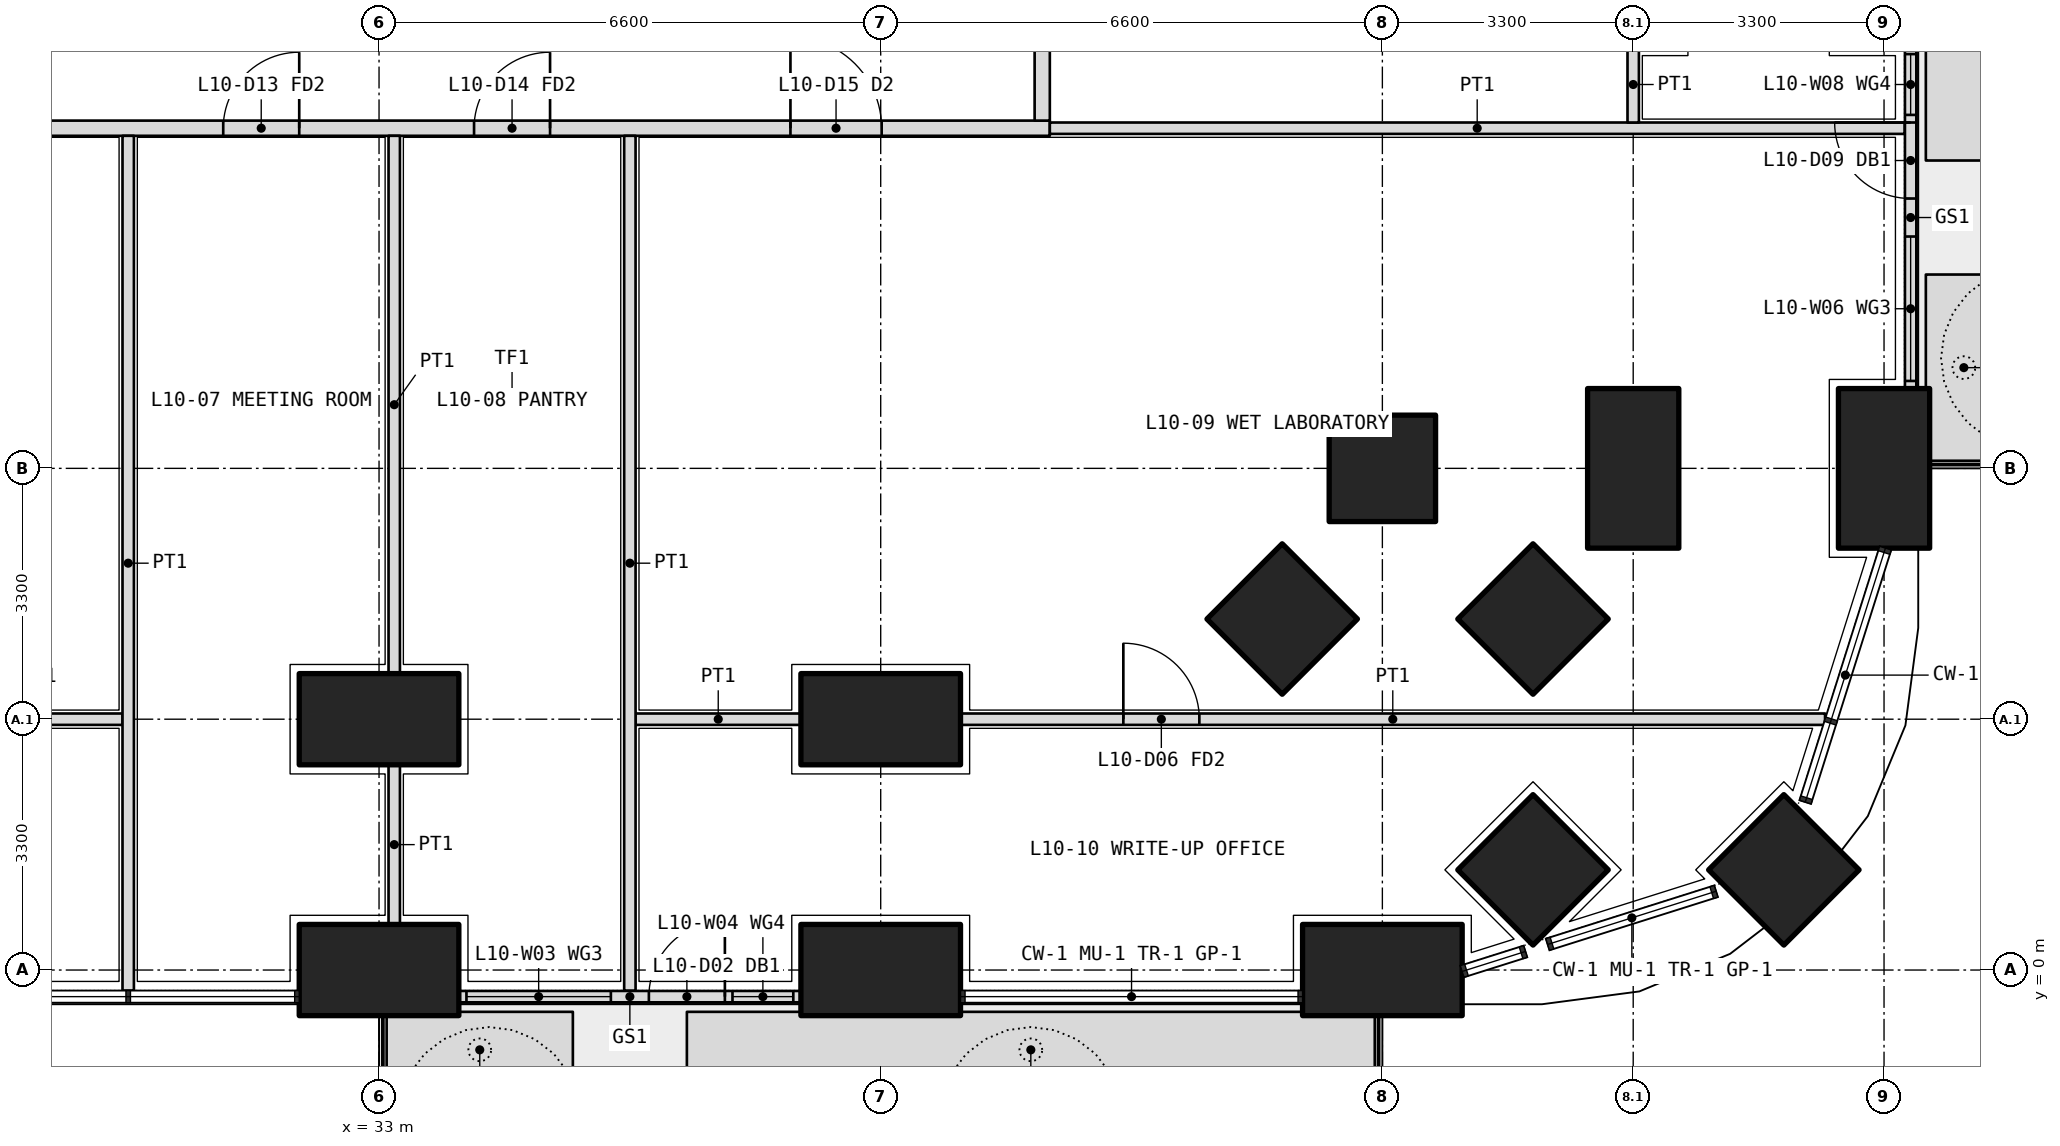
"""IFC4 building model, lengths in metres.
Left out: names, types, materials, properties, quantities, classifications, styles, units other than length and angle.
Written with IfcOpenShell. Run it as: python <this file> out.ifc"""

import sys

from ifc_helpers import new_model, si_unit, direction, frame, frame_2d, origin, origin_2d, place, context, subcontext, project, spatial, polyline, rectangle, outline, extrude, element, fill, save


model = new_model("IFC4")
c1 = context("Model", 3, precision=1e-05, world=origin(), true_north=direction((0.0, 1.0)))
c2 = subcontext(c1, "Body", "Model", "MODEL_VIEW")
j1 = project(units=[si_unit("LENGTHUNIT", "METRE"), si_unit("PLANEANGLEUNIT", "RADIAN")], contexts=[c1])
p1 = place(None, origin())
s1 = spatial("IfcSite", under=j1, at=p1, CompositionType="ELEMENT")
p2 = place(p1, origin())
s2 = spatial("IfcBuilding", under=s1, at=p2, CompositionType="ELEMENT")
p3 = place(p2, frame((0.0, 0.0, 46.5)))
s3 = spatial("IfcBuildingStorey", under=s2, at=p3, CompositionType="ELEMENT", Elevation=46.5)
p4 = place(p3, frame((51.482, 1.318, 0.0), z_axis=(0.0, 0.0, 1.0), x_axis=(0.707106781187, 0.707106781187, 0.0)))
e1 = element("IfcColumn", 1, at=p4, inside=s3, PredefinedType="COLUMN", context=c2, shape_type="SweptSolid", body=[
    extrude(rectangle(XDim=1.4, YDim=1.4, at=origin_2d()), origin(), (0.0, 0.0, 1.0), 4.2),
])
for number, where, z_axis, x_axis in (
    (2, (33.0, 0.0, 0.0), (0.0, 0.0, 1.0), (1.0, 0.0, 0.0)),
    (3, (39.6, 0.0, 0.0), (0.0, 0.0, 1.0), (1.0, 0.0, 0.0)),
    (4, (46.2, 0.0, 0.0), (0.0, 0.0, 1.0), (1.0, 0.0, 0.0)),
    (5, (52.8, 6.6, 0.0), (0.0, 0.0, 1.0), (0.0, 1.0, 0.0)),
):
    element("IfcColumn", number, at=place(p3, frame(where, z_axis=z_axis, x_axis=x_axis)), inside=s3, PredefinedType="COLUMN", context=c2, shape_type="SweptSolid", body=[
        extrude(rectangle(XDim=2.1, YDim=1.2, at=origin_2d()), origin(), (0.0, 0.0, 1.0), 4.2),
    ])
for number, where, z_axis, x_axis in (
    (6, (46.2, 6.6, 0.0), (0.0, 0.0, 1.0), (1.0, 0.0, 0.0)),
    (7, (48.182, 1.318, 0.0), (0.0, 0.0, 1.0), (0.707, 0.707, 0.0)),
):
    element("IfcColumn", number, at=place(p3, frame(where, z_axis=z_axis, x_axis=x_axis)), inside=s3, PredefinedType="COLUMN", context=c2, shape_type="SweptSolid", body=[
        extrude(rectangle(XDim=1.4, YDim=1.4, at=origin_2d()), origin(), (0.0, 0.0, 1.0), 4.2),
    ])
p5 = place(p3, frame((49.5, 6.6, 0.0), z_axis=(0.0, 0.0, 1.0), x_axis=(0.0, 1.0, 0.0)))
e8 = element("IfcColumn", 8, at=p5, inside=s3, PredefinedType="COLUMN", context=c2, shape_type="SweptSolid", body=[
    extrude(rectangle(XDim=2.1, YDim=1.2, at=origin_2d()), origin(), (0.0, 0.0, 1.0), 4.2),
])
p6 = place(p3, frame((48.182, 4.618, 0.0), z_axis=(0.0, 0.0, 1.0), x_axis=(0.707106781187, 0.707106781187, 0.0)))
e9 = element("IfcColumn", 9, at=p6, inside=s3, PredefinedType="COLUMN", context=c2, shape_type="SweptSolid", body=[
    extrude(rectangle(XDim=1.4, YDim=1.4, at=origin_2d()), origin(), (0.0, 0.0, 1.0), 4.2),
])
for number, where, z_axis, x_axis in (
    (10, (33.0, 3.3, 0.0), (0.0, 0.0, 1.0), (1.0, 0.0, 0.0)),
    (11, (39.6, 3.3, 0.0), (0.0, 0.0, 1.0), (1.0, 0.0, 0.0)),
):
    element("IfcColumn", number, at=place(p3, frame(where, z_axis=z_axis, x_axis=x_axis)), inside=s3, PredefinedType="COLUMN", context=c2, shape_type="SweptSolid", body=[
        extrude(rectangle(XDim=2.1, YDim=1.2, at=origin_2d()), origin(), (0.0, 0.0, 1.0), 4.2),
    ])
p7 = place(p3, frame((44.882, 4.618, 0.0), z_axis=(0.0, 0.0, 1.0), x_axis=(0.707106781187, 0.707106781187, 0.0)))
e12 = element("IfcColumn", 12, at=p7, inside=s3, PredefinedType="COLUMN", context=c2, shape_type="SweptSolid", body=[
    extrude(rectangle(XDim=1.4, YDim=1.4, at=origin_2d()), origin(), (0.0, 0.0, 1.0), 4.2),
])
p8 = place(p3, origin())
e13 = element("IfcWall", 13, at=p8, inside=s3, PredefinedType="USERDEFINED", context=c2, shape_type="SweptSolid", body=[
    extrude(outline(polyline([(33.1, -1.55), (35.55, -1.55), (35.55, -0.55), (33.1, -0.55), (33.1, -1.55)]), holes=[polyline([(33.25, -1.4), (35.4, -1.4), (35.4, -0.7), (33.25, -0.7), (33.25, -1.4)])]), origin(), (0.0, 0.0, 1.0), 1.05),
])
p9 = place(p3, origin())
e14 = element("IfcWall", 14, at=p9, inside=s3, PredefinedType="USERDEFINED", context=c2, shape_type="SweptSolid", body=[
    extrude(outline(polyline([(37.05, -1.55), (46.1, -1.55), (46.1, -0.55), (37.05, -0.55), (37.05, -1.55)]), holes=[polyline([(37.2, -1.4), (45.95, -1.4), (45.95, -0.7), (37.2, -0.7), (37.2, -1.4)])]), origin(), (0.0, 0.0, 1.0), 1.05),
])
p10 = place(p3, origin())
e15 = element("IfcWall", 15, at=p10, inside=s3, PredefinedType="USERDEFINED", context=c2, shape_type="SweptSolid", body=[
    extrude(outline(polyline([(53.35, 6.7), (54.35, 6.7), (54.35, 9.15), (53.35, 9.15), (53.35, 6.7)]), holes=[polyline([(53.5, 6.85), (54.2, 6.85), (54.2, 9.0), (53.5, 9.0), (53.5, 6.85)])]), origin(), (0.0, 0.0, 1.0), 1.05),
])
p11 = place(p3, origin())
e16 = element("IfcWall", 16, at=p11, inside=s3, PredefinedType="USERDEFINED", context=c2, shape_type="SweptSolid", body=[
    extrude(outline(polyline([(53.35, 10.65), (54.35, 10.65), (54.35, 19.7), (53.35, 19.7), (53.35, 10.65)]), holes=[polyline([(53.5, 10.8), (54.2, 10.8), (54.2, 19.55), (53.5, 19.55), (53.5, 10.8)])]), origin(), (0.0, 0.0, 1.0), 1.05),
])
p12 = place(p3, frame((34.05, -0.35, 0.0), z_axis=(0.0, 0.0, 1.0), x_axis=(1.0, 0.0, 0.0)))
e17 = element("IfcWall", 17, at=p12, inside=s3, PredefinedType="SOLIDWALL", context=c2, shape_type="SweptSolid", body=[
    extrude(rectangle(XDim=4.5, YDim=0.15, at=frame_2d((2.25, 0.0))), origin(), (0.0, 0.0, 1.0), 2.7),
])
p13 = place(p12, frame((2.5, 0.0, 0.0)))
e18 = element("IfcOpeningElement", 18, at=p13, cuts=e17, PredefinedType="OPENING", context=c2, shape_type="SweptSolid", body=[
    extrude(rectangle(XDim=1.0, YDim=2.4, at=frame_2d((0.5, 1.2))), frame((0.0, 0.085, 0.0), z_axis=(0.0, -1.0, 0.0), x_axis=(1.0, 0.0, 0.0)), (0.0, 0.0, 1.0), 0.17),
])
p14 = place(p12, frame((0.1, 0.0, 0.1)))
e19 = element("IfcOpeningElement", 19, at=p14, cuts=e17, PredefinedType="OPENING", context=c2, shape_type="SweptSolid", body=[
    extrude(rectangle(XDim=1.9, YDim=2.3, at=frame_2d((0.95, 1.15))), frame((0.0, 0.085, 0.0), z_axis=(0.0, -1.0, 0.0), x_axis=(1.0, 0.0, 0.0)), (0.0, 0.0, 1.0), 0.17),
])
p15 = place(p12, frame((3.6, 0.0, 0.1)))
e20 = element("IfcOpeningElement", 20, at=p15, cuts=e17, PredefinedType="OPENING", context=c2, shape_type="SweptSolid", body=[
    extrude(rectangle(XDim=0.8, YDim=2.3, at=frame_2d((0.4, 1.15))), frame((0.0, 0.085, 0.0), z_axis=(0.0, -1.0, 0.0), x_axis=(1.0, 0.0, 0.0)), (0.0, 0.0, 1.0), 0.17),
])
p16 = place(p3, frame((53.15, 7.65, 0.0), z_axis=(0.0, 0.0, 1.0), x_axis=(0.0, 1.0, 0.0)))
e21 = element("IfcWall", 21, at=p16, inside=s3, PredefinedType="SOLIDWALL", context=c2, shape_type="SweptSolid", body=[
    extrude(rectangle(XDim=4.5, YDim=0.15, at=frame_2d((2.25, 0.0))), origin(), (0.0, 0.0, 1.0), 2.7),
])
p17 = place(p16, frame((2.5, 0.0, 0.0)))
e22 = element("IfcOpeningElement", 22, at=p17, cuts=e21, PredefinedType="OPENING", context=c2, shape_type="SweptSolid", body=[
    extrude(rectangle(XDim=1.0, YDim=2.4, at=frame_2d((0.5, 1.2))), frame((0.0, 0.085, 0.0), z_axis=(0.0, -1.0, 0.0), x_axis=(1.0, 0.0, 0.0)), (0.0, 0.0, 1.0), 0.17),
])
p18 = place(p16, frame((0.1, 0.0, 0.1)))
e23 = element("IfcOpeningElement", 23, at=p18, cuts=e21, PredefinedType="OPENING", context=c2, shape_type="SweptSolid", body=[
    extrude(rectangle(XDim=1.9, YDim=2.3, at=frame_2d((0.95, 1.15))), frame((0.0, 0.085, 0.0), z_axis=(0.0, -1.0, 0.0), x_axis=(1.0, 0.0, 0.0)), (0.0, 0.0, 1.0), 0.17),
])
p19 = place(p16, frame((3.6, 0.0, 0.1)))
e24 = element("IfcOpeningElement", 24, at=p19, cuts=e21, PredefinedType="OPENING", context=c2, shape_type="SweptSolid", body=[
    extrude(rectangle(XDim=0.8, YDim=2.3, at=frame_2d((0.4, 1.15))), frame((0.0, 0.085, 0.0), z_axis=(0.0, -1.0, 0.0), x_axis=(1.0, 0.0, 0.0)), (0.0, 0.0, 1.0), 0.17),
])
p20 = place(p3, frame((10.975, 11.075, 0.0), z_axis=(0.0, 0.0, 1.0), x_axis=(1.0, 0.0, 0.0)))
e25 = element("IfcWall", 25, at=p20, inside=s3, PredefinedType="PARTITIONING", context=c2, shape_type="SweptSolid", body=[
    extrude(rectangle(XDim=30.85, YDim=0.2, at=frame_2d((15.425, 0.0))), origin(), (0.0, 0.0, 1.0), 2.85),
])
p21 = place(p20, frame((2.312, 0.0, 0.0)))
e26 = element("IfcOpeningElement", 26, at=p21, cuts=e25, PredefinedType="OPENING", context=c2, shape_type="SweptSolid", body=[
    extrude(rectangle(XDim=1.0, YDim=2.1, at=frame_2d((0.5, 1.05))), frame((0.0, 0.11, 0.0), z_axis=(0.0, -1.0, 0.0), x_axis=(1.0, 0.0, 0.0)), (0.0, 0.0, 1.0), 0.22),
])
p22 = place(p20, frame((6.575, 0.0, 0.0)))
e27 = element("IfcOpeningElement", 27, at=p22, cuts=e25, PredefinedType="OPENING", context=c2, shape_type="SweptSolid", body=[
    extrude(rectangle(XDim=1.2, YDim=2.1, at=frame_2d((0.6, 1.05))), frame((0.0, 0.11, 0.0), z_axis=(0.0, -1.0, 0.0), x_axis=(1.0, 0.0, 0.0)), (0.0, 0.0, 1.0), 0.22),
])
p23 = place(p20, frame((13.275, 0.0, 0.0)))
e28 = element("IfcOpeningElement", 28, at=p23, cuts=e25, PredefinedType="OPENING", context=c2, shape_type="SweptSolid", body=[
    extrude(rectangle(XDim=1.0, YDim=2.1, at=frame_2d((0.5, 1.05))), frame((0.0, 0.11, 0.0), z_axis=(0.0, -1.0, 0.0), x_axis=(1.0, 0.0, 0.0)), (0.0, 0.0, 1.0), 0.22),
])
p24 = place(p20, frame((19.975, 0.0, 0.0)))
e29 = element("IfcOpeningElement", 29, at=p24, cuts=e25, PredefinedType="OPENING", context=c2, shape_type="SweptSolid", body=[
    extrude(rectangle(XDim=1.0, YDim=2.1, at=frame_2d((0.5, 1.05))), frame((0.0, 0.11, 0.0), z_axis=(0.0, -1.0, 0.0), x_axis=(1.0, 0.0, 0.0)), (0.0, 0.0, 1.0), 0.22),
])
p25 = place(p20, frame((23.275, 0.0, 0.0)))
e30 = element("IfcOpeningElement", 30, at=p25, cuts=e25, PredefinedType="OPENING", context=c2, shape_type="SweptSolid", body=[
    extrude(rectangle(XDim=1.0, YDim=2.1, at=frame_2d((0.5, 1.05))), frame((0.0, 0.11, 0.0), z_axis=(0.0, -1.0, 0.0), x_axis=(1.0, 0.0, 0.0)), (0.0, 0.0, 1.0), 0.22),
])
p26 = place(p20, frame((27.438, 0.0, 0.0)))
e31 = element("IfcOpeningElement", 31, at=p26, cuts=e25, PredefinedType="OPENING", context=c2, shape_type="SweptSolid", body=[
    extrude(rectangle(XDim=1.2, YDim=2.1, at=frame_2d((0.6, 1.05))), frame((0.0, 0.11, 0.0), z_axis=(0.0, -1.0, 0.0), x_axis=(1.0, 0.0, 0.0)), (0.0, 0.0, 1.0), 0.22),
])
p27 = place(p3, frame((41.725, 11.175, 0.0), z_axis=(0.0, 0.0, 1.0), x_axis=(0.0, 1.0, 0.0)))
e32 = element("IfcWall", 32, at=p27, inside=s3, PredefinedType="PARTITIONING", context=c2, shape_type="SweptSolid", body=[
    extrude(rectangle(XDim=23.85, YDim=0.2, at=frame_2d((11.925, 0.0))), origin(), (0.0, 0.0, 1.0), 2.85),
])
p28 = place(p27, frame((3.762, 0.0, 0.0)))
e33 = element("IfcOpeningElement", 33, at=p28, cuts=e32, PredefinedType="OPENING", context=c2, shape_type="SweptSolid", body=[
    extrude(rectangle(XDim=1.0, YDim=2.1, at=frame_2d((0.5, 1.05))), frame((0.0, 0.11, 0.0), z_axis=(0.0, -1.0, 0.0), x_axis=(1.0, 0.0, 0.0)), (0.0, 0.0, 1.0), 0.22),
])
p29 = place(p27, frame((9.625, 0.0, 0.0)))
e34 = element("IfcOpeningElement", 34, at=p29, cuts=e32, PredefinedType="OPENING", context=c2, shape_type="SweptSolid", body=[
    extrude(rectangle(XDim=1.0, YDim=2.1, at=frame_2d((0.5, 1.05))), frame((0.0, 0.11, 0.0), z_axis=(0.0, -1.0, 0.0), x_axis=(1.0, 0.0, 0.0)), (0.0, 0.0, 1.0), 0.22),
])
p30 = place(p27, frame((12.975, 0.0, 0.0)))
e35 = element("IfcOpeningElement", 35, at=p30, cuts=e32, PredefinedType="OPENING", context=c2, shape_type="SweptSolid", body=[
    extrude(rectangle(XDim=0.9, YDim=2.1, at=frame_2d((0.45, 1.05))), frame((0.0, 0.11, 0.0), z_axis=(0.0, -1.0, 0.0), x_axis=(1.0, 0.0, 0.0)), (0.0, 0.0, 1.0), 0.22),
])
p31 = place(p27, frame((17.925, 0.0, 0.0)))
e36 = element("IfcOpeningElement", 36, at=p31, cuts=e32, PredefinedType="OPENING", context=c2, shape_type="SweptSolid", body=[
    extrude(rectangle(XDim=1.2, YDim=2.1, at=frame_2d((0.6, 1.05))), frame((0.0, 0.11, 0.0), z_axis=(0.0, -1.0, 0.0), x_axis=(1.0, 0.0, 0.0)), (0.0, 0.0, 1.0), 0.22),
])
p32 = place(p27, frame((22.387, 0.0, 0.0)))
e37 = element("IfcOpeningElement", 37, at=p32, cuts=e32, PredefinedType="OPENING", context=c2, shape_type="SweptSolid", body=[
    extrude(rectangle(XDim=1.0, YDim=2.1, at=frame_2d((0.5, 1.05))), frame((0.0, 0.11, 0.0), z_axis=(0.0, -1.0, 0.0), x_axis=(1.0, 0.0, 0.0)), (0.0, 0.0, 1.0), 0.22),
])
p33 = place(p3, frame((53.07, 11.075, 0.0), z_axis=(0.0, 0.0, 1.0), x_axis=(-1.0, 0.0, 0.0)))
e38 = element("IfcWall", 38, at=p33, inside=s3, PredefinedType="PARTITIONING", context=c2, shape_type="SweptSolid", body=[
    extrude(rectangle(XDim=11.245, YDim=0.15, at=frame_2d((5.623, 0.0))), origin(), (0.0, 0.0, 1.0), 2.7),
])
for number, where, z_axis, x_axis in (
    (39, (27.45, 3.3, 0.0), (0.0, 0.0, 1.0), (1.0, 0.0, 0.0)),
    (40, (36.375, 3.3, 0.0), (0.0, 0.0, 1.0), (1.0, 0.0, 0.0)),
):
    element("IfcWall", number, at=place(p3, frame(where, z_axis=z_axis, x_axis=x_axis)), inside=s3, PredefinedType="PARTITIONING", context=c2, shape_type="SweptSolid", body=[
        extrude(rectangle(XDim=2.175, YDim=0.15, at=frame_2d((1.087, 0.0))), origin(), (0.0, 0.0, 1.0), 3.9),
    ])
p34 = place(p3, frame((40.65, 3.3, 0.0), z_axis=(0.0, 0.0, 1.0), x_axis=(1.0, 0.0, 0.0)))
e41 = element("IfcWall", 41, at=p34, inside=s3, PredefinedType="PARTITIONING", context=c2, shape_type="SweptSolid", body=[
    extrude(rectangle(XDim=11.374, YDim=0.15, at=frame_2d((5.687, 0.0))), origin(), (0.0, 0.0, 1.0), 2.7),
])
p35 = place(p34, frame((2.142, 0.0, 0.0)))
e42 = element("IfcOpeningElement", 42, at=p35, cuts=e41, PredefinedType="OPENING", context=c2, shape_type="SweptSolid", body=[
    extrude(rectangle(XDim=1.0, YDim=2.1, at=frame_2d((0.5, 1.05))), frame((0.0, 0.085, 0.0), z_axis=(0.0, -1.0, 0.0), x_axis=(1.0, 0.0, 0.0)), (0.0, 0.0, 1.0), 0.17),
])
p36 = place(p3, frame((33.2, 0.6, 0.0), z_axis=(0.0, 0.0, 1.0), x_axis=(0.0, 1.0, 0.0)))
e43 = element("IfcWall", 43, at=p36, inside=s3, PredefinedType="PARTITIONING", context=c2, shape_type="SweptSolid", body=[
    extrude(rectangle(XDim=2.1, YDim=0.15, at=frame_2d((1.05, 0.0))), origin(), (0.0, 0.0, 1.0), 2.85),
])
p37 = place(p3, frame((33.2, 3.9, 0.0), z_axis=(0.0, 0.0, 1.0), x_axis=(0.0, 1.0, 0.0)))
e44 = element("IfcWall", 44, at=p37, inside=s3, PredefinedType="PARTITIONING", context=c2, shape_type="SweptSolid", body=[
    extrude(rectangle(XDim=7.075, YDim=0.15, at=frame_2d((3.538, 0.0))), origin(), (0.0, 0.0, 1.0), 2.85),
])
for number, where, z_axis, x_axis in (
    (45, (36.3, -0.27, 0.0), (0.0, 0.0, 1.0), (0.0, 1.0, 0.0)),
    (46, (29.7, -0.27, 0.0), (0.0, 0.0, 1.0), (0.0, 1.0, 0.0)),
):
    element("IfcWall", number, at=place(p3, frame(where, z_axis=z_axis, x_axis=x_axis)), inside=s3, PredefinedType="PARTITIONING", context=c2, shape_type="SweptSolid", body=[
        extrude(rectangle(XDim=11.245, YDim=0.15, at=frame_2d((5.623, 0.0))), origin(), (0.0, 0.0, 1.0), 2.7),
    ])
p38 = place(p3, frame((49.5, 11.15, 0.0), z_axis=(0.0, 0.0, 1.0), x_axis=(0.0, 1.0, 0.0)))
e47 = element("IfcWall", 47, at=p38, inside=s3, PredefinedType="PARTITIONING", context=c2, shape_type="SweptSolid", body=[
    extrude(rectangle(XDim=1.0, YDim=0.15, at=frame_2d((0.5, 0.0))), origin(), (0.0, 0.0, 1.0), 3.9),
])
p39 = place(p13, origin())
e48 = element("IfcDoor", 48, at=p39, inside=s3, OperationType="SINGLE_SWING_RIGHT", PredefinedType="DOOR", context=c2, shape_type="SweptSolid", body=[
    extrude(rectangle(XDim=1.0, YDim=2.4, at=frame_2d((0.5, 1.2))), frame((0.0, 0.025, 0.0), z_axis=(0.0, -1.0, 0.0), x_axis=(1.0, 0.0, 0.0)), (0.0, 0.0, 1.0), 0.05),
])
fill(e18, e48)
p40 = place(p14, origin())
e49 = element("IfcWindow", 49, at=p40, inside=s3, PartitioningType="SINGLE_PANEL", PredefinedType="WINDOW", context=c2, shape_type="SweptSolid", body=[
    extrude(rectangle(XDim=1.9, YDim=2.3, at=frame_2d((0.95, 1.15))), frame((0.0, 0.03, 0.0), z_axis=(0.0, -1.0, 0.0), x_axis=(1.0, 0.0, 0.0)), (0.0, 0.0, 1.0), 0.06),
])
fill(e19, e49)
p41 = place(p15, origin())
e50 = element("IfcWindow", 50, at=p41, inside=s3, PartitioningType="SINGLE_PANEL", PredefinedType="WINDOW", context=c2, shape_type="SweptSolid", body=[
    extrude(rectangle(XDim=0.8, YDim=2.3, at=frame_2d((0.4, 1.15))), frame((0.0, 0.03, 0.0), z_axis=(0.0, -1.0, 0.0), x_axis=(1.0, 0.0, 0.0)), (0.0, 0.0, 1.0), 0.06),
])
fill(e20, e50)
p42 = place(p17, origin())
e51 = element("IfcDoor", 51, at=p42, inside=s3, OperationType="SINGLE_SWING_RIGHT", PredefinedType="DOOR", context=c2, shape_type="SweptSolid", body=[
    extrude(rectangle(XDim=1.0, YDim=2.4, at=frame_2d((0.5, 1.2))), frame((0.0, 0.025, 0.0), z_axis=(0.0, -1.0, 0.0), x_axis=(1.0, 0.0, 0.0)), (0.0, 0.0, 1.0), 0.05),
])
fill(e22, e51)
p43 = place(p18, origin())
e52 = element("IfcWindow", 52, at=p43, inside=s3, PartitioningType="SINGLE_PANEL", PredefinedType="WINDOW", context=c2, shape_type="SweptSolid", body=[
    extrude(rectangle(XDim=1.9, YDim=2.3, at=frame_2d((0.95, 1.15))), frame((0.0, 0.03, 0.0), z_axis=(0.0, -1.0, 0.0), x_axis=(1.0, 0.0, 0.0)), (0.0, 0.0, 1.0), 0.06),
])
fill(e23, e52)
p44 = place(p19, origin())
e53 = element("IfcWindow", 53, at=p44, inside=s3, PartitioningType="SINGLE_PANEL", PredefinedType="WINDOW", context=c2, shape_type="SweptSolid", body=[
    extrude(rectangle(XDim=0.8, YDim=2.3, at=frame_2d((0.4, 1.15))), frame((0.0, 0.03, 0.0), z_axis=(0.0, -1.0, 0.0), x_axis=(1.0, 0.0, 0.0)), (0.0, 0.0, 1.0), 0.06),
])
fill(e24, e53)
p45 = place(p24, origin())
e54 = element("IfcDoor", 54, at=p45, inside=s3, OperationType="SINGLE_SWING_RIGHT", PredefinedType="DOOR", context=c2, shape_type="SweptSolid", body=[
    extrude(rectangle(XDim=1.0, YDim=2.1, at=frame_2d((0.5, 1.05))), frame((0.0, 0.025, 0.0), z_axis=(0.0, -1.0, 0.0), x_axis=(1.0, 0.0, 0.0)), (0.0, 0.0, 1.0), 0.05),
])
fill(e29, e54)
p46 = place(p25, origin())
e55 = element("IfcDoor", 55, at=p46, inside=s3, OperationType="SINGLE_SWING_RIGHT", PredefinedType="DOOR", context=c2, shape_type="SweptSolid", body=[
    extrude(rectangle(XDim=1.0, YDim=2.1, at=frame_2d((0.5, 1.05))), frame((0.0, 0.025, 0.0), z_axis=(0.0, -1.0, 0.0), x_axis=(1.0, 0.0, 0.0)), (0.0, 0.0, 1.0), 0.05),
])
fill(e30, e55)
p47 = place(p26, origin())
e56 = element("IfcDoor", 56, at=p47, inside=s3, OperationType="DOUBLE_DOOR_SINGLE_SWING", PredefinedType="DOOR", context=c2, shape_type="SweptSolid", body=[
    extrude(rectangle(XDim=1.2, YDim=2.1, at=frame_2d((0.6, 1.05))), frame((0.0, 0.025, 0.0), z_axis=(0.0, -1.0, 0.0), x_axis=(1.0, 0.0, 0.0)), (0.0, 0.0, 1.0), 0.05),
])
fill(e31, e56)
p48 = place(p35, origin())
e57 = element("IfcDoor", 57, at=p48, inside=s3, OperationType="SINGLE_SWING_LEFT", PredefinedType="DOOR", context=c2, shape_type="SweptSolid", body=[
    extrude(rectangle(XDim=1.0, YDim=2.1, at=frame_2d((0.5, 1.05))), frame((0.0, 0.025, 0.0), z_axis=(0.0, -1.0, 0.0), x_axis=(1.0, 0.0, 0.0)), (0.0, 0.0, 1.0), 0.05),
])
fill(e42, e57)
save(model, sys.argv[1])
